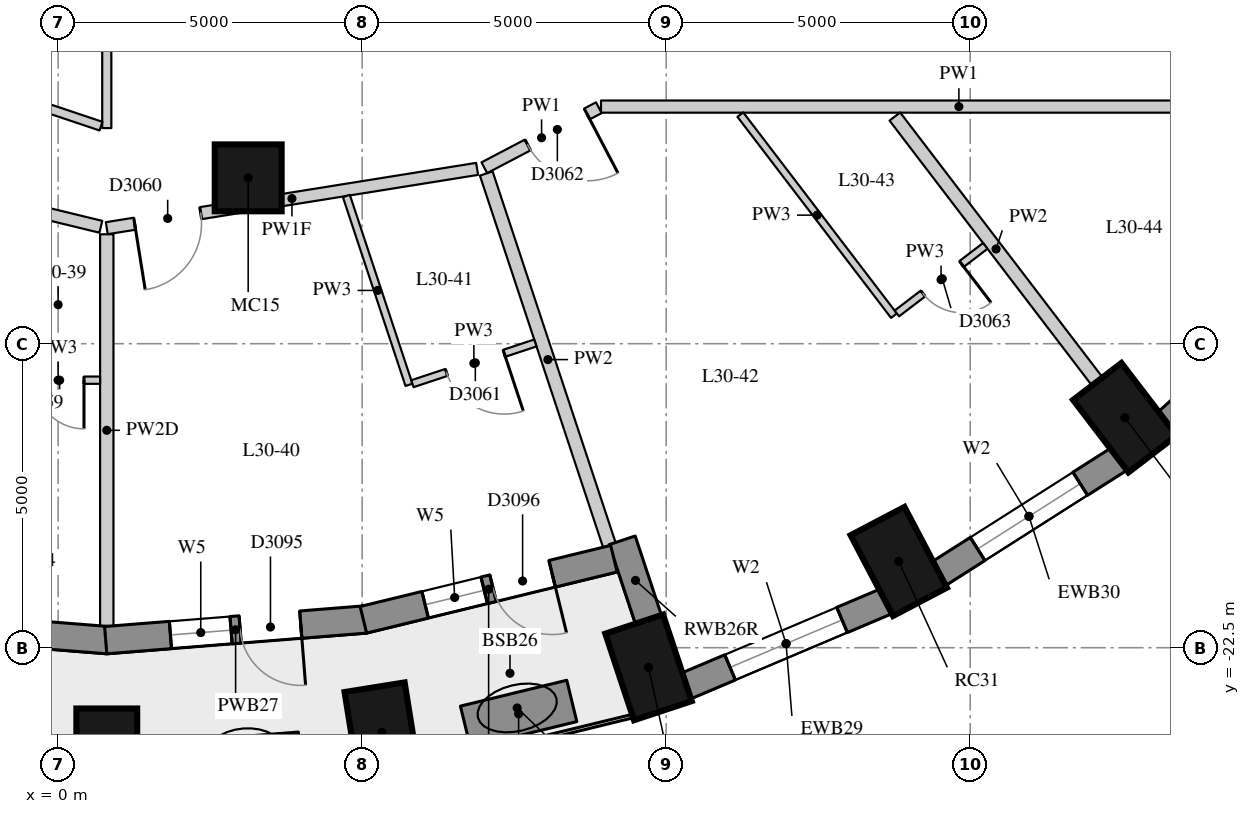
"""IFC4 building model, lengths in metres.
Left out: names, types, materials, properties, quantities, classifications, styles, units other than length and angle.
Written with IfcOpenShell. Run it as: python <this file> out.ifc"""

import sys

from ifc_helpers import new_model, si_unit, direction, frame, frame_2d, origin, origin_2d, place, context, subcontext, project, spatial, rectangle, extrude, element, fill, save


model = new_model("IFC4")
c1 = context("Model", 3, precision=1e-05, world=origin(), true_north=direction((0.0, 1.0)))
c2 = subcontext(c1, "Body", "Model", "MODEL_VIEW")
j1 = project(units=[si_unit("LENGTHUNIT", "METRE"), si_unit("PLANEANGLEUNIT", "RADIAN")], contexts=[c1])
p1 = place(None, origin())
s1 = spatial("IfcSite", under=j1, at=p1, CompositionType="ELEMENT")
p2 = place(p1, origin())
s2 = spatial("IfcBuilding", under=s1, at=p2, CompositionType="ELEMENT")
p3 = place(p2, frame((0.0, 0.0, 108.7)))
s3 = spatial("IfcBuildingStorey", under=s2, at=p3, CompositionType="ELEMENT", Elevation=108.7)
for number, where, z_axis, x_axis in (
    (1, (0.8, -24.25, 0.0), (0.0, 0.0, 1.0), (0.0, -1.0, 0.0)),
    (2, (5.323, -23.891, 0.0), (0.0, 0.0, 1.0), (0.159, -0.987, 0.0)),
    (3, (9.71, -22.824, 0.0), (0.0, 0.0, 1.0), (0.315, -0.949, 0.0)),
    (4, (13.825, -21.082, 0.0), (0.0, 0.0, 1.0), (0.465, -0.885, 0.0)),
    (5, (17.545, -18.717, 0.0), (0.0, 0.0, 1.0), (0.607, -0.795, 0.0)),
):
    element("IfcColumn", number, at=place(p3, frame(where, z_axis=z_axis, x_axis=x_axis)), inside=s3, PredefinedType="COLUMN", context=c2, shape_type="SweptSolid", body=[
        extrude(rectangle(XDim=1.5, YDim=1.0, at=origin_2d()), origin(), (0.0, 0.0, 1.0), 3.3),
    ])
p4 = place(p3, frame((3.126, -14.772, 0.0), z_axis=(0.0, 0.0, 1.0), x_axis=(1.0, 0.0, 0.0)))
e6 = element("IfcColumn", 6, at=p4, inside=s3, PredefinedType="COLUMN", context=c2, shape_type="SweptSolid", body=[
    extrude(rectangle(XDim=1.1, YDim=1.1, at=origin_2d()), origin(), (0.0, 0.0, 1.0), 3.3),
])
p5 = place(p3, frame((10.318, -23.134, 0.0), z_axis=(0.0, 0.0, 1.0), x_axis=(0.920869643542, 0.389870619055, 0.0)))
e7 = element("IfcWall", 7, at=p5, inside=s3, PredefinedType="SOLIDWALL", context=c2, shape_type="SweptSolid", body=[
    extrude(rectangle(XDim=3.591, YDim=0.45, at=frame_2d((1.796, 0.0))), origin(), (0.0, 0.0, 1.0), 3.02),
])
p6 = place(p5, frame((0.796, 0.0, 0.4)))
e8 = element("IfcOpeningElement", 8, at=p6, cuts=e7, PredefinedType="OPENING", context=c2, shape_type="SweptSolid", body=[
    extrude(rectangle(XDim=2.0, YDim=1.75, at=frame_2d((1.0, 0.875))), frame((0.0, 0.235, 0.0), z_axis=(0.0, -1.0, 0.0), x_axis=(1.0, 0.0, 0.0)), (0.0, 0.0, 1.0), 0.47),
])
p7 = place(p3, frame((14.475, -21.287, 0.0), z_axis=(0.0, 0.0, 1.0), x_axis=(0.843911841423, 0.536481876587, 0.0)))
e9 = element("IfcWall", 9, at=p7, inside=s3, PredefinedType="SOLIDWALL", context=c2, shape_type="SweptSolid", body=[
    extrude(rectangle(XDim=3.532, YDim=0.45, at=frame_2d((1.766, 0.0))), origin(), (0.0, 0.0, 1.0), 3.02),
])
p8 = place(p7, frame((0.766, 0.0, 0.4)))
e10 = element("IfcOpeningElement", 10, at=p8, cuts=e9, PredefinedType="OPENING", context=c2, shape_type="SweptSolid", body=[
    extrude(rectangle(XDim=2.0, YDim=1.75, at=frame_2d((1.0, 0.875))), frame((0.0, 0.235, 0.0), z_axis=(0.0, -1.0, 0.0), x_axis=(1.0, 0.0, 0.0)), (0.0, 0.0, 1.0), 0.47),
])
p9 = place(p3, frame((18.219, -18.81, 0.0), z_axis=(0.0, 0.0, 1.0), x_axis=(0.740364106106, 0.672206062446, 0.0)))
e11 = element("IfcWall", 11, at=p9, inside=s3, PredefinedType="SOLIDWALL", context=c2, shape_type="SweptSolid", body=[
    extrude(rectangle(XDim=3.464, YDim=0.45, at=frame_2d((1.732, 0.0))), origin(), (0.0, 0.0, 1.0), 3.02),
])
p10 = place(p3, frame((9.714, -22.053, 0.0), z_axis=(0.0, 0.0, 1.0), x_axis=(-0.314647068585, 0.949208734805, 0.0)))
e12 = element("IfcWall", 12, at=p10, inside=s3, PredefinedType="SOLIDWALL", context=c2, shape_type="SweptSolid", body=[
    extrude(rectangle(XDim=1.39, YDim=0.45, at=frame_2d((0.695, 0.0))), origin(), (0.0, 0.0, 1.0), 3.02),
])
p11 = place(p3, frame((-3.438, -22.037, 0.0), z_axis=(0.0, 0.0, 1.0), x_axis=(0.996844307919, -0.079381520332, 0.0)))
e13 = element("IfcWall", 13, at=p11, inside=s3, PredefinedType="SOLIDWALL", context=c2, shape_type="SweptSolid", body=[
    extrude(rectangle(XDim=4.269, YDim=0.45, at=frame_2d((2.134, 0.0))), origin(), (0.0, 0.0, 1.0), 3.02),
])
p12 = place(p11, frame((1.06, 0.0, 0.4)))
e14 = element("IfcOpeningElement", 14, at=p12, cuts=e13, PredefinedType="OPENING", context=c2, shape_type="SweptSolid", body=[
    extrude(rectangle(XDim=1.0, YDim=1.75, at=frame_2d((0.5, 0.875))), frame((0.0, 0.235, 0.0), z_axis=(0.0, -1.0, 0.0), x_axis=(1.0, 0.0, 0.0)), (0.0, 0.0, 1.0), 0.47),
])
p13 = place(p11, frame((2.209, 0.0, 0.0)))
e15 = element("IfcOpeningElement", 15, at=p13, cuts=e13, PredefinedType="OPENING", context=c2, shape_type="SweptSolid", body=[
    extrude(rectangle(XDim=1.0, YDim=2.15, at=frame_2d((0.5, 1.075))), frame((0.0, 0.235, 0.0), z_axis=(0.0, -1.0, 0.0), x_axis=(1.0, 0.0, 0.0)), (0.0, 0.0, 1.0), 0.47),
])
p14 = place(p3, frame((0.782, -22.376, 0.0), z_axis=(0.0, 0.0, 1.0), x_axis=(0.996843465986, 0.079392092303, 0.0)))
e16 = element("IfcWall", 16, at=p14, inside=s3, PredefinedType="SOLIDWALL", context=c2, shape_type="SweptSolid", body=[
    extrude(rectangle(XDim=4.287, YDim=0.45, at=frame_2d((2.143, 0.0))), origin(), (0.0, 0.0, 1.0), 3.02),
])
p15 = place(p14, frame((1.068, 0.0, 0.4)))
e17 = element("IfcOpeningElement", 17, at=p15, cuts=e16, PredefinedType="OPENING", context=c2, shape_type="SweptSolid", body=[
    extrude(rectangle(XDim=1.0, YDim=1.75, at=frame_2d((0.5, 0.875))), frame((0.0, 0.235, 0.0), z_axis=(0.0, -1.0, 0.0), x_axis=(1.0, 0.0, 0.0)), (0.0, 0.0, 1.0), 0.47),
])
p16 = place(p14, frame((2.219, 0.0, 0.0)))
e18 = element("IfcOpeningElement", 18, at=p16, cuts=e16, PredefinedType="OPENING", context=c2, shape_type="SweptSolid", body=[
    extrude(rectangle(XDim=1.0, YDim=2.15, at=frame_2d((0.5, 1.075))), frame((0.0, 0.235, 0.0), z_axis=(0.0, -1.0, 0.0), x_axis=(1.0, 0.0, 0.0)), (0.0, 0.0, 1.0), 0.47),
])
p17 = place(p3, frame((5.02, -22.041, 0.0), z_axis=(0.0, 0.0, 1.0), x_axis=(0.971521631711, 0.236950879125, 0.0)))
e19 = element("IfcWall", 19, at=p17, inside=s3, PredefinedType="SOLIDWALL", context=c2, shape_type="SweptSolid", body=[
    extrude(rectangle(XDim=4.241, YDim=0.45, at=frame_2d((2.121, 0.0))), origin(), (0.0, 0.0, 1.0), 3.02),
])
p18 = place(p17, frame((1.045, 0.0, 0.4)))
e20 = element("IfcOpeningElement", 20, at=p18, cuts=e19, PredefinedType="OPENING", context=c2, shape_type="SweptSolid", body=[
    extrude(rectangle(XDim=1.0, YDim=1.75, at=frame_2d((0.5, 0.875))), frame((0.0, 0.235, 0.0), z_axis=(0.0, -1.0, 0.0), x_axis=(1.0, 0.0, 0.0)), (0.0, 0.0, 1.0), 0.47),
])
p19 = place(p17, frame((2.196, 0.0, 0.0)))
e21 = element("IfcOpeningElement", 21, at=p19, cuts=e19, PredefinedType="OPENING", context=c2, shape_type="SweptSolid", body=[
    extrude(rectangle(XDim=1.0, YDim=2.15, at=frame_2d((0.5, 1.075))), frame((0.0, 0.235, 0.0), z_axis=(0.0, -1.0, 0.0), x_axis=(1.0, 0.0, 0.0)), (0.0, 0.0, 1.0), 0.47),
])
for number, where, z_axis, x_axis in (
    (22, (2.184, -24.378, 0.0), (0.0, 0.0, 1.0), (0.997, 0.079, 0.0)),
    (23, (6.699, -23.801, 0.0), (0.0, 0.0, 1.0), (0.972, 0.236, 0.0)),
):
    element("IfcWall", number, at=place(p3, frame(where, z_axis=z_axis, x_axis=x_axis)), inside=s3, PredefinedType="USERDEFINED", context=c2, shape_type="SweptSolid", body=[
        extrude(rectangle(XDim=1.8, YDim=0.7, at=frame_2d((0.9, 0.0))), origin(), (0.0, 0.0, 1.0), 0.75),
    ])
p20 = place(p3, frame((20.7, -13.6, 0.0), z_axis=(0.0, 0.0, 1.0), x_axis=(-1.0, 0.0, 0.0)))
e24 = element("IfcWall", 24, at=p20, inside=s3, PredefinedType="PARTITIONING", context=c2, shape_type="SweptSolid", body=[
    extrude(rectangle(XDim=11.772, YDim=0.2, at=frame_2d((5.886, 0.0))), origin(), (0.0, 0.0, 1.0), 3.02),
])
p21 = place(p3, frame((8.892, -13.619, 0.0), z_axis=(0.0, 0.0, 1.0), x_axis=(-0.885696642175, -0.464264426852, 0.0)))
e25 = element("IfcWall", 25, at=p21, inside=s3, PredefinedType="PARTITIONING", context=c2, shape_type="SweptSolid", body=[
    extrude(rectangle(XDim=2.126, YDim=0.2, at=frame_2d((1.063, 0.0))), origin(), (0.0, 0.0, 1.0), 3.02),
])
p22 = place(p21, frame((0.22, 0.0, 0.0)))
e26 = element("IfcOpeningElement", 26, at=p22, cuts=e25, PredefinedType="OPENING", context=c2, shape_type="SweptSolid", body=[
    extrude(rectangle(XDim=1.1, YDim=2.1, at=frame_2d((0.55, 1.05))), frame((0.0, 0.11, 0.0), z_axis=(0.0, -1.0, 0.0), x_axis=(1.0, 0.0, 0.0)), (0.0, 0.0, 1.0), 0.22),
])
p23 = place(p3, frame((6.891, -14.625, 0.0), z_axis=(0.0, 0.0, 1.0), x_axis=(-0.987419134366, -0.158124802253, 0.0)))
e27 = element("IfcWall", 27, at=p23, inside=s3, PredefinedType="PARTITIONING", context=c2, shape_type="SweptSolid", body=[
    extrude(rectangle(XDim=6.168, YDim=0.2, at=frame_2d((3.084, 0.0))), origin(), (0.0, 0.0, 1.0), 2.42),
])
p24 = place(p23, frame((4.604, 0.0, 0.0)))
e28 = element("IfcOpeningElement", 28, at=p24, cuts=e27, PredefinedType="OPENING", context=c2, shape_type="SweptSolid", body=[
    extrude(rectangle(XDim=1.1, YDim=2.1, at=frame_2d((0.55, 1.05))), frame((0.0, 0.11, 0.0), z_axis=(0.0, -1.0, 0.0), x_axis=(1.0, 0.0, 0.0)), (0.0, 0.0, 1.0), 0.22),
])
p25 = place(p3, frame((0.702, -15.577, 0.0), z_axis=(0.0, 0.0, 1.0), x_axis=(-0.971804733873, 0.235787105715, 0.0)))
e29 = element("IfcWall", 29, at=p25, inside=s3, PredefinedType="PARTITIONING", context=c2, shape_type="SweptSolid", body=[
    extrude(rectangle(XDim=8.852, YDim=0.2, at=frame_2d((4.426, 0.0))), origin(), (0.0, 0.0, 1.0), 2.42),
])
p26 = place(p25, frame((5.631, 0.0, 0.0)))
e30 = element("IfcOpeningElement", 30, at=p26, cuts=e29, PredefinedType="OPENING", context=c2, shape_type="SweptSolid", body=[
    extrude(rectangle(XDim=1.1, YDim=2.1, at=frame_2d((0.55, 1.05))), frame((0.0, 0.11, 0.0), z_axis=(0.0, -1.0, 0.0), x_axis=(1.0, 0.0, 0.0)), (0.0, 0.0, 1.0), 0.22),
])
p27 = place(p25, frame((1.863, 0.0, 0.0)))
e31 = element("IfcOpeningElement", 31, at=p27, cuts=e29, PredefinedType="OPENING", context=c2, shape_type="SweptSolid", body=[
    extrude(rectangle(XDim=1.0, YDim=2.1, at=frame_2d((0.5, 1.05))), frame((0.0, 0.11, 0.0), z_axis=(0.0, -1.0, 0.0), x_axis=(1.0, 0.0, 0.0)), (0.0, 0.0, 1.0), 0.22),
])
p28 = place(p3, frame((0.8, -9.23, 0.0), z_axis=(0.0, 0.0, 1.0), x_axis=(0.0, -1.0, 0.0)))
e32 = element("IfcWall", 32, at=p28, inside=s3, PredefinedType="PARTITIONING", context=c2, shape_type="SweptSolid", body=[
    extrude(rectangle(XDim=4.724, YDim=0.15, at=frame_2d((2.362, 0.0))), origin(), (0.0, 0.0, 1.0), 3.02),
])
p29 = place(p28, frame((1.912, 0.0, 0.0)))
e33 = element("IfcOpeningElement", 33, at=p29, cuts=e32, PredefinedType="OPENING", context=c2, shape_type="SweptSolid", body=[
    extrude(rectangle(XDim=0.9, YDim=2.1, at=frame_2d((0.45, 1.05))), frame((0.0, 0.085, 0.0), z_axis=(0.0, -1.0, 0.0), x_axis=(1.0, 0.0, 0.0)), (0.0, 0.0, 1.0), 0.17),
])
p30 = place(p3, frame((0.705, -13.922, 0.0), z_axis=(0.0, 0.0, 1.0), x_axis=(-0.948131483463, 0.317878420258, 0.0)))
e34 = element("IfcWall", 34, at=p30, inside=s3, PredefinedType="PARTITIONING", context=c2, shape_type="SweptSolid", body=[
    extrude(rectangle(XDim=3.46, YDim=0.15, at=frame_2d((1.73, 0.0))), origin(), (0.0, 0.0, 1.0), 3.02),
])
p31 = place(p3, frame((0.8, -22.149, 0.0), z_axis=(0.0, 0.0, 1.0), x_axis=(0.0, 1.0, 0.0)))
e35 = element("IfcWall", 35, at=p31, inside=s3, PredefinedType="PARTITIONING", context=c2, shape_type="SweptSolid", body=[
    extrude(rectangle(XDim=6.448, YDim=0.22, at=frame_2d((3.224, 0.0))), origin(), (0.0, 0.0, 1.0), 2.47),
])
p32 = place(p3, frame((9.069, -20.822, 0.0), z_axis=(0.0, 0.0, 1.0), x_axis=(-0.31452344537, 0.949249704932, 0.0)))
e36 = element("IfcWall", 36, at=p32, inside=s3, PredefinedType="PARTITIONING", context=c2, shape_type="SweptSolid", body=[
    extrude(rectangle(XDim=6.448, YDim=0.22, at=frame_2d((3.224, 0.0))), origin(), (0.0, 0.0, 1.0), 3.02),
])
p33 = place(p3, frame((17.089, -18.121, 0.0), z_axis=(0.0, 0.0, 1.0), x_axis=(-0.607064955951, 0.794652212767, 0.0)))
e37 = element("IfcWall", 37, at=p33, inside=s3, PredefinedType="PARTITIONING", context=c2, shape_type="SweptSolid", body=[
    extrude(rectangle(XDim=5.483, YDim=0.22, at=frame_2d((2.742, 0.0))), origin(), (0.0, 0.0, 1.0), 3.02),
])
p34 = place(p3, frame((4.74, -15.07, 0.0), z_axis=(0.0, 0.0, 1.0), x_axis=(0.314526308998, -0.949248756095, 0.0)))
e38 = element("IfcWall", 38, at=p34, inside=s3, PredefinedType="PARTITIONING", context=c2, shape_type="SweptSolid", body=[
    extrude(rectangle(XDim=3.272, YDim=0.12, at=frame_2d((1.636, 0.0))), origin(), (0.0, 0.0, 1.0), 3.02),
])
p35 = place(p3, frame((11.219, -13.732, 0.0), z_axis=(0.0, 0.0, 1.0), x_axis=(0.607090774052, -0.794632488677, 0.0)))
e39 = element("IfcWall", 39, at=p35, inside=s3, PredefinedType="PARTITIONING", context=c2, shape_type="SweptSolid", body=[
    extrude(rectangle(XDim=4.162, YDim=0.12, at=frame_2d((2.081, 0.0))), origin(), (0.0, 0.0, 1.0), 3.02),
])
p36 = place(p3, frame((-0.69, -18.1, 0.0), z_axis=(0.0, 0.0, 1.0), x_axis=(1.0, 0.0, 0.0)))
e40 = element("IfcWall", 40, at=p36, inside=s3, PredefinedType="PARTITIONING", context=c2, shape_type="SweptSolid", body=[
    extrude(rectangle(XDim=1.38, YDim=0.12, at=frame_2d((0.69, 0.0))), origin(), (0.0, 0.0, 1.0), 3.02),
])
p37 = place(p36, frame((0.315, 0.0, 0.0)))
e41 = element("IfcOpeningElement", 41, at=p37, cuts=e40, PredefinedType="OPENING", context=c2, shape_type="SweptSolid", body=[
    extrude(rectangle(XDim=0.8, YDim=2.1, at=frame_2d((0.4, 1.05))), frame((0.0, 0.07, 0.0), z_axis=(0.0, -1.0, 0.0), x_axis=(1.0, 0.0, 0.0)), (0.0, 0.0, 1.0), 0.14),
])
p38 = place(p3, frame((5.827, -18.158, 0.0), z_axis=(0.0, 0.0, 1.0), x_axis=(0.94926636949, 0.314473146318, 0.0)))
e42 = element("IfcWall", 42, at=p38, inside=s3, PredefinedType="PARTITIONING", context=c2, shape_type="SweptSolid", body=[
    extrude(rectangle(XDim=2.13, YDim=0.12, at=frame_2d((1.065, 0.0))), origin(), (0.0, 0.0, 1.0), 3.02),
])
p39 = place(p38, frame((0.59, 0.0, 0.0)))
e43 = element("IfcOpeningElement", 43, at=p39, cuts=e42, PredefinedType="OPENING", context=c2, shape_type="SweptSolid", body=[
    extrude(rectangle(XDim=1.0, YDim=2.1, at=frame_2d((0.5, 1.05))), frame((0.0, 0.07, 0.0), z_axis=(0.0, -1.0, 0.0), x_axis=(1.0, 0.0, 0.0)), (0.0, 0.0, 1.0), 0.14),
])
p40 = place(p3, frame((13.794, -17.002, 0.0), z_axis=(0.0, 0.0, 1.0), x_axis=(0.794653128783, 0.607063756878, 0.0)))
e44 = element("IfcWall", 44, at=p40, inside=s3, PredefinedType="PARTITIONING", context=c2, shape_type="SweptSolid", body=[
    extrude(rectangle(XDim=1.83, YDim=0.12, at=frame_2d((0.915, 0.0))), origin(), (0.0, 0.0, 1.0), 3.02),
])
p41 = place(p40, frame((0.54, 0.0, 0.0)))
e45 = element("IfcOpeningElement", 45, at=p41, cuts=e44, PredefinedType="OPENING", context=c2, shape_type="SweptSolid", body=[
    extrude(rectangle(XDim=0.8, YDim=2.1, at=frame_2d((0.4, 1.05))), frame((0.0, 0.07, 0.0), z_axis=(0.0, -1.0, 0.0), x_axis=(1.0, 0.0, 0.0)), (0.0, 0.0, 1.0), 0.14),
])
p42 = place(p6, origin())
e46 = element("IfcWindow", 46, at=p42, inside=s3, PartitioningType="SINGLE_PANEL", PredefinedType="WINDOW", context=c2, shape_type="SweptSolid", body=[
    extrude(rectangle(XDim=2.0, YDim=1.75, at=frame_2d((1.0, 0.875))), frame((0.0, 0.035, 0.0), z_axis=(0.0, -1.0, 0.0), x_axis=(1.0, 0.0, 0.0)), (0.0, 0.0, 1.0), 0.06),
])
fill(e8, e46)
p43 = place(p8, origin())
e47 = element("IfcWindow", 47, at=p43, inside=s3, PartitioningType="SINGLE_PANEL", PredefinedType="WINDOW", context=c2, shape_type="SweptSolid", body=[
    extrude(rectangle(XDim=2.0, YDim=1.75, at=frame_2d((1.0, 0.875))), frame((0.0, 0.035, 0.0), z_axis=(0.0, -1.0, 0.0), x_axis=(1.0, 0.0, 0.0)), (0.0, 0.0, 1.0), 0.06),
])
fill(e10, e47)
p44 = place(p15, origin())
e48 = element("IfcWindow", 48, at=p44, inside=s3, PartitioningType="SINGLE_PANEL", PredefinedType="WINDOW", context=c2, shape_type="SweptSolid", body=[
    extrude(rectangle(XDim=1.0, YDim=1.75, at=frame_2d((0.5, 0.875))), frame((0.0, 0.035, 0.0), z_axis=(0.0, -1.0, 0.0), x_axis=(1.0, 0.0, 0.0)), (0.0, 0.0, 1.0), 0.06),
])
fill(e17, e48)
p45 = place(p16, frame((1.0, 0.0, 0.0), z_axis=(0.0, 0.0, 1.0), x_axis=(-1.0, 0.0, 0.0)))
e49 = element("IfcDoor", 49, at=p45, inside=s3, OperationType="SINGLE_SWING_LEFT", PredefinedType="DOOR", context=c2, shape_type="SweptSolid", body=[
    extrude(rectangle(XDim=1.0, YDim=2.15, at=frame_2d((0.5, 1.075))), frame((0.0, 0.075, 0.0), z_axis=(0.0, -1.0, 0.0), x_axis=(1.0, 0.0, 0.0)), (0.0, 0.0, 1.0), 0.05),
])
fill(e18, e49)
p46 = place(p18, origin())
e50 = element("IfcWindow", 50, at=p46, inside=s3, PartitioningType="SINGLE_PANEL", PredefinedType="WINDOW", context=c2, shape_type="SweptSolid", body=[
    extrude(rectangle(XDim=1.0, YDim=1.75, at=frame_2d((0.5, 0.875))), frame((0.0, 0.035, 0.0), z_axis=(0.0, -1.0, 0.0), x_axis=(1.0, 0.0, 0.0)), (0.0, 0.0, 1.0), 0.06),
])
fill(e20, e50)
p47 = place(p19, frame((1.0, 0.0, 0.0), z_axis=(0.0, 0.0, 1.0), x_axis=(-1.0, 0.0, 0.0)))
e51 = element("IfcDoor", 51, at=p47, inside=s3, OperationType="SINGLE_SWING_LEFT", PredefinedType="DOOR", context=c2, shape_type="SweptSolid", body=[
    extrude(rectangle(XDim=1.0, YDim=2.15, at=frame_2d((0.5, 1.075))), frame((0.0, 0.075, 0.0), z_axis=(0.0, -1.0, 0.0), x_axis=(1.0, 0.0, 0.0)), (0.0, 0.0, 1.0), 0.05),
])
fill(e21, e51)
p48 = place(p37, origin())
e52 = element("IfcDoor", 52, at=p48, inside=s3, OperationType="SINGLE_SWING_LEFT", PredefinedType="DOOR", context=c2, shape_type="SweptSolid", body=[
    extrude(rectangle(XDim=0.8, YDim=2.1, at=frame_2d((0.4, 1.05))), frame((0.0, 0.025, 0.0), z_axis=(0.0, -1.0, 0.0), x_axis=(1.0, 0.0, 0.0)), (0.0, 0.0, 1.0), 0.05),
])
fill(e41, e52)
p49 = place(p24, origin())
e53 = element("IfcDoor", 53, at=p49, inside=s3, OperationType="SINGLE_SWING_RIGHT", PredefinedType="DOOR", context=c2, shape_type="SweptSolid", body=[
    extrude(rectangle(XDim=1.1, YDim=2.1, at=frame_2d((0.55, 1.05))), frame((0.0, 0.025, 0.0), z_axis=(0.0, -1.0, 0.0), x_axis=(1.0, 0.0, 0.0)), (0.0, 0.0, 1.0), 0.05),
])
fill(e28, e53)
p50 = place(p39, origin())
e54 = element("IfcDoor", 54, at=p50, inside=s3, OperationType="SINGLE_SWING_LEFT", PredefinedType="DOOR", context=c2, shape_type="SweptSolid", body=[
    extrude(rectangle(XDim=1.0, YDim=2.1, at=frame_2d((0.5, 1.05))), frame((0.0, 0.025, 0.0), z_axis=(0.0, -1.0, 0.0), x_axis=(1.0, 0.0, 0.0)), (0.0, 0.0, 1.0), 0.05),
])
fill(e43, e54)
p51 = place(p22, origin())
e55 = element("IfcDoor", 55, at=p51, inside=s3, OperationType="SINGLE_SWING_LEFT", PredefinedType="DOOR", context=c2, shape_type="SweptSolid", body=[
    extrude(rectangle(XDim=1.1, YDim=2.1, at=frame_2d((0.55, 1.05))), frame((0.0, 0.025, 0.0), z_axis=(0.0, -1.0, 0.0), x_axis=(1.0, 0.0, 0.0)), (0.0, 0.0, 1.0), 0.05),
])
fill(e26, e55)
p52 = place(p41, origin())
e56 = element("IfcDoor", 56, at=p52, inside=s3, OperationType="SINGLE_SWING_LEFT", PredefinedType="DOOR", context=c2, shape_type="SweptSolid", body=[
    extrude(rectangle(XDim=0.8, YDim=2.1, at=frame_2d((0.4, 1.05))), frame((0.0, 0.025, 0.0), z_axis=(0.0, -1.0, 0.0), x_axis=(1.0, 0.0, 0.0)), (0.0, 0.0, 1.0), 0.05),
])
fill(e45, e56)
save(model, sys.argv[1])
